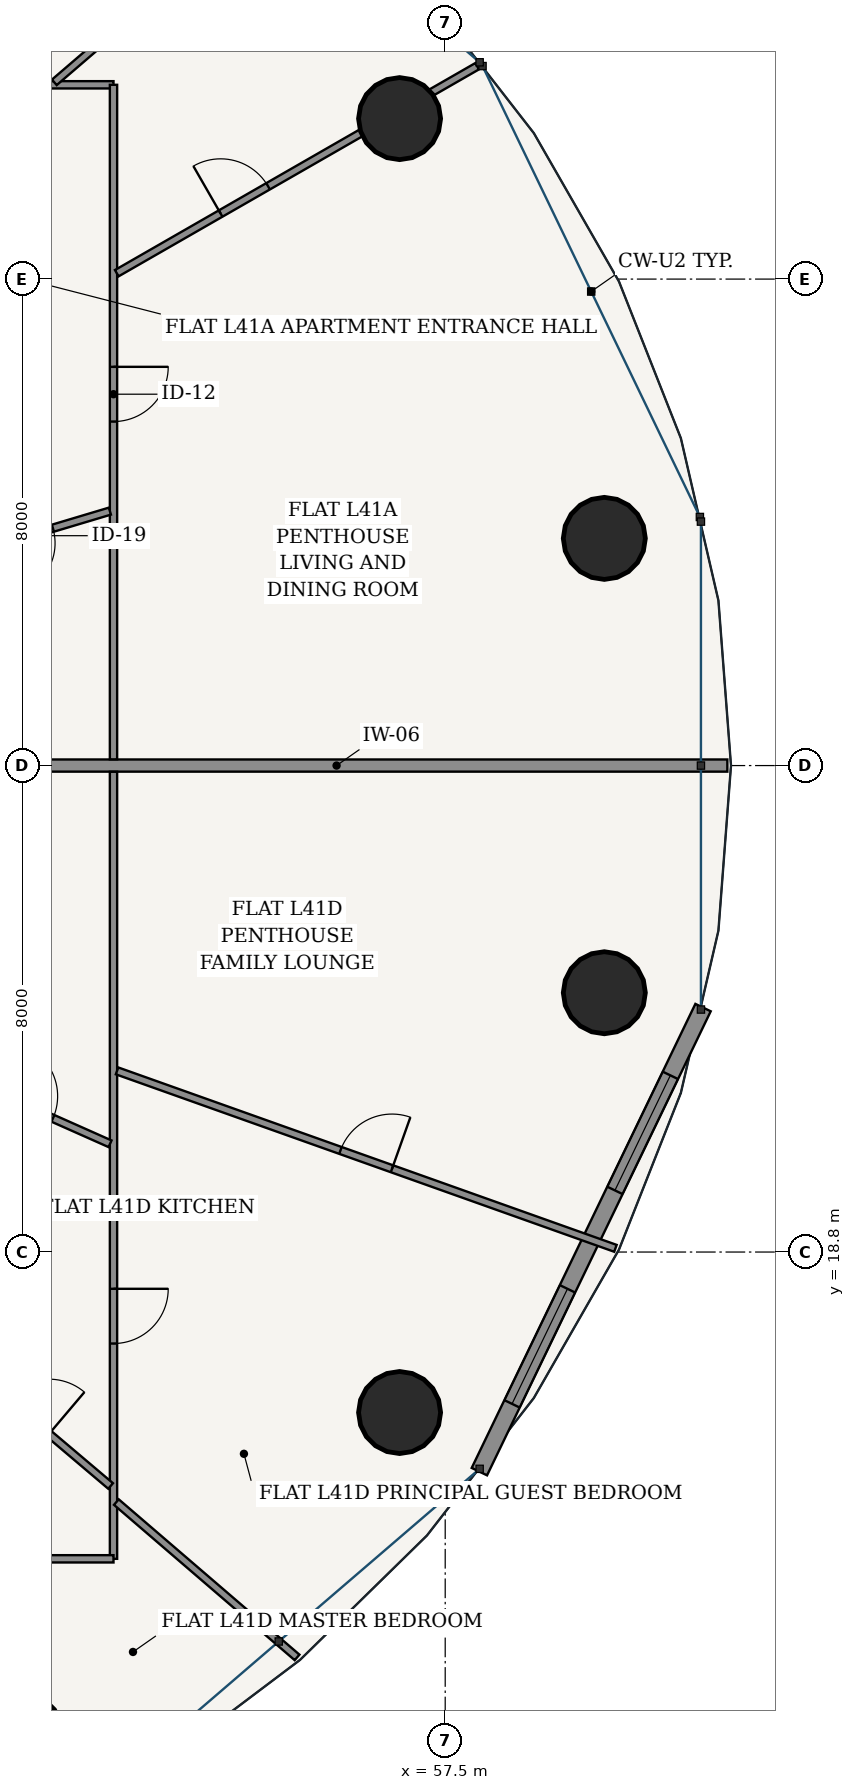
"""IFC4 building model, lengths in metres.
Left out: names, types, materials, properties, quantities, classifications, styles, units other than length and angle.
Written with IfcOpenShell. Run it as: python <this file> out.ifc"""

import sys

from ifc_helpers import new_model, si_unit, direction, frame, frame_2d, origin, origin_2d, place, context, subcontext, project, spatial, rectangle, hollow_circle, extrude, source, transform, mapped, element, fill, save


model = new_model("IFC4")
c1 = context("Model", 3, precision=1e-05, world=origin(), true_north=direction((-0.2419218956, 0.970295726276)))
c2 = subcontext(c1, "Body", "Model", "MODEL_VIEW")
j1 = project(units=[si_unit("LENGTHUNIT", "METRE"), si_unit("PLANEANGLEUNIT", "RADIAN")], contexts=[c1])
p1 = place(None, origin())
s1 = spatial("IfcSite", under=j1, at=p1, CompositionType="ELEMENT")
p2 = place(p1, origin())
s2 = spatial("IfcBuilding", under=s1, at=p2, CompositionType="ELEMENT")
p3 = place(p2, frame((0.0, 0.0, 157.0)))
s3 = spatial("IfcBuildingStorey", under=s2, at=p3, CompositionType="ELEMENT", Elevation=157.0)
for number, where, z_axis, x_axis in (
    (1, (60.117, 30.536, 0.0), (0.0, 0.0, 1.0), (1.0, 0.0, 0.0)),
    (2, (56.75, 37.439, 0.0), (0.0, 0.0, 1.0), (1.0, 0.0, 0.0)),
    (3, (50.528, 10.877, 0.0), (0.0, 0.0, 1.0), (1.0, 0.0, 0.0)),
    (4, (56.75, 16.161, 0.0), (0.0, 0.0, 1.0), (1.0, 0.0, 0.0)),
    (5, (60.117, 23.064, 0.0), (0.0, 0.0, 1.0), (1.0, 0.0, 0.0)),
):
    element("IfcColumn", number, at=place(p3, frame(where, z_axis=z_axis, x_axis=x_axis)), inside=s3, PredefinedType="COLUMN", context=c2, shape_type="SweptSolid", body=[
        extrude(hollow_circle(Radius=0.675, WallThickness=0.042, at=origin_2d()), origin(), (0.0, 0.0, 1.0), 3.6),
    ])
p4 = place(p3, frame((58.062, 15.189, 0.0), z_axis=(0.0, 0.0, 1.0), x_axis=(0.434209827226, 0.900811759437, 0.0)))
e6 = element("IfcWall", 6, at=p4, inside=s3, PredefinedType="SOLIDWALL", context=c2, shape_type="SweptSolid", body=[
    extrude(rectangle(XDim=8.472, YDim=0.28, at=frame_2d((4.236, 0.0))), origin(), (0.0, 0.0, 1.0), 3.33),
])
p5 = place(p4, frame((1.237, 0.0, 0.85)))
e7 = element("IfcOpeningElement", 7, at=p5, cuts=e6, PredefinedType="OPENING", context=c2, shape_type="SweptSolid", body=[
    extrude(rectangle(XDim=2.1, YDim=1.95, at=frame_2d((1.05, 0.975))), frame((0.0, 0.15, 0.0), z_axis=(0.0, -1.0, 0.0), x_axis=(1.0, 0.0, 0.0)), (0.0, 0.0, 1.0), 0.3),
])
p6 = place(p4, frame((5.134, 0.0, 0.85)))
e8 = element("IfcOpeningElement", 8, at=p6, cuts=e6, PredefinedType="OPENING", context=c2, shape_type="SweptSolid", body=[
    extrude(rectangle(XDim=2.1, YDim=1.95, at=frame_2d((1.05, 0.975))), frame((0.0, 0.15, 0.0), z_axis=(0.0, -1.0, 0.0), x_axis=(1.0, 0.0, 0.0)), (0.0, 0.0, 1.0), 0.3),
])
p7 = place(p3, frame((49.287, 26.8, 0.0), z_axis=(0.0, 0.0, 1.0), x_axis=(1.0, 0.0, 0.0)))
e9 = element("IfcWall", 9, at=p7, inside=s3, PredefinedType="PARTITIONING", context=c2, shape_type="SweptSolid", body=[
    extrude(rectangle(XDim=12.853, YDim=0.2, at=frame_2d((6.426, 0.0))), origin(), (0.0, 0.0, 1.0), 2.846),
])
p8 = place(p3, frame((44.355, 37.995, 0.0), z_axis=(0.0, 0.0, 1.0), x_axis=(1.0, 0.0, 0.0)))
e10 = element("IfcWall", 10, at=p8, inside=s3, PredefinedType="PARTITIONING", context=c2, shape_type="SweptSolid", body=[
    extrude(rectangle(XDim=7.69, YDim=0.12, at=frame_2d((3.845, 0.0))), origin(), (0.0, 0.0, 1.0), 2.776),
])
p9 = place(p8, frame((0.887, 0.0, 0.0)))
e11 = element("IfcOpeningElement", 11, at=p9, cuts=e10, PredefinedType="OPENING", context=c2, shape_type="SweptSolid", body=[
    extrude(rectangle(XDim=0.9, YDim=2.15, at=frame_2d((0.45, 1.075))), frame((0.0, 0.07, 0.0), z_axis=(0.0, -1.0, 0.0), x_axis=(1.0, 0.0, 0.0)), (0.0, 0.0, 1.0), 0.14),
])
p10 = place(p3, frame((52.045, 37.995, 0.0), z_axis=(0.0, 0.0, 1.0), x_axis=(0.0, -1.0, 0.0)))
e12 = element("IfcWall", 12, at=p10, inside=s3, PredefinedType="PARTITIONING", context=c2, shape_type="SweptSolid", body=[
    extrude(rectangle(XDim=11.093, YDim=0.12, at=frame_2d((5.546, 0.0))), origin(), (0.0, 0.0, 1.0), 2.776),
])
p11 = place(p10, frame((4.638, 0.0, 0.0)))
e13 = element("IfcOpeningElement", 13, at=p11, cuts=e12, PredefinedType="OPENING", context=c2, shape_type="SweptSolid", body=[
    extrude(rectangle(XDim=0.9, YDim=2.15, at=frame_2d((0.45, 1.075))), frame((0.0, 0.07, 0.0), z_axis=(0.0, -1.0, 0.0), x_axis=(1.0, 0.0, 0.0)), (0.0, 0.0, 1.0), 0.14),
])
p12 = place(p3, frame((52.099, 34.897, 0.0), z_axis=(0.0, 0.0, 1.0), x_axis=(0.867170536447, 0.498011305813, 0.0)))
e14 = element("IfcWall", 14, at=p12, inside=s3, PredefinedType="PARTITIONING", context=c2, shape_type="SweptSolid", body=[
    extrude(rectangle(XDim=6.834, YDim=0.12, at=frame_2d((3.417, 0.0))), origin(), (0.0, 0.0, 1.0), 2.776),
])
p13 = place(p12, frame((1.969, 0.0, 0.0)))
e15 = element("IfcOpeningElement", 15, at=p13, cuts=e14, PredefinedType="OPENING", context=c2, shape_type="SweptSolid", body=[
    extrude(rectangle(XDim=0.9, YDim=2.15, at=frame_2d((0.45, 1.075))), frame((0.0, 0.07, 0.0), z_axis=(0.0, -1.0, 0.0), x_axis=(1.0, 0.0, 0.0)), (0.0, 0.0, 1.0), 0.14),
])
p14 = place(p3, frame((51.072, 38.035, 0.0), z_axis=(0.0, 0.0, 1.0), x_axis=(0.758368609512, 0.65182593697, 0.0)))
e16 = element("IfcWall", 16, at=p14, inside=s3, PredefinedType="PARTITIONING", context=c2, shape_type="SweptSolid", body=[
    extrude(rectangle(XDim=5.263, YDim=0.12, at=frame_2d((2.632, 0.0))), origin(), (0.0, 0.0, 1.0), 2.846),
])
p15 = place(p3, frame((46.741, 38.044, 0.0), z_axis=(0.0, 0.0, 1.0), x_axis=(0.613770587295, 0.789484430607, 0.0)))
e17 = element("IfcWall", 17, at=p15, inside=s3, PredefinedType="PARTITIONING", context=c2, shape_type="SweptSolid", body=[
    extrude(rectangle(XDim=7.556, YDim=0.12, at=frame_2d((3.778, 0.0))), origin(), (0.0, 0.0, 1.0), 2.776),
])
p16 = place(p15, frame((2.325, 0.0, 0.0)))
e18 = element("IfcOpeningElement", 18, at=p16, cuts=e17, PredefinedType="OPENING", context=c2, shape_type="SweptSolid", body=[
    extrude(rectangle(XDim=0.9, YDim=2.15, at=frame_2d((0.45, 1.075))), frame((0.0, 0.07, 0.0), z_axis=(0.0, -1.0, 0.0), x_axis=(1.0, 0.0, 0.0)), (0.0, 0.0, 1.0), 0.14),
])
p17 = place(p3, frame((49.287, 30.177, 0.0), z_axis=(0.0, 0.0, 1.0), x_axis=(0.958045462778, 0.28661627876, 0.0)))
e19 = element("IfcWall", 19, at=p17, inside=s3, PredefinedType="PARTITIONING", context=c2, shape_type="SweptSolid", body=[
    extrude(rectangle(XDim=2.817, YDim=0.12, at=frame_2d((1.408, 0.0))), origin(), (0.0, 0.0, 1.0), 3.33),
])
p18 = place(p17, frame((0.979, 0.0, 0.0)))
e20 = element("IfcOpeningElement", 20, at=p18, cuts=e19, PredefinedType="OPENING", context=c2, shape_type="SweptSolid", body=[
    extrude(rectangle(XDim=0.86, YDim=2.15, at=frame_2d((0.43, 1.075))), frame((0.0, 0.07, 0.0), z_axis=(0.0, -1.0, 0.0), x_axis=(1.0, 0.0, 0.0)), (0.0, 0.0, 1.0), 0.14),
])
p19 = place(p3, frame((52.045, 26.698, 0.0), z_axis=(0.0, 0.0, 1.0), x_axis=(0.0, -1.0, 0.0)))
e21 = element("IfcWall", 21, at=p19, inside=s3, PredefinedType="PARTITIONING", context=c2, shape_type="SweptSolid", body=[
    extrude(rectangle(XDim=12.943, YDim=0.12, at=frame_2d((6.472, 0.0))), origin(), (0.0, 0.0, 1.0), 2.776),
])
p20 = place(p19, frame((8.503, 0.0, 0.0)))
e22 = element("IfcOpeningElement", 22, at=p20, cuts=e21, PredefinedType="OPENING", context=c2, shape_type="SweptSolid", body=[
    extrude(rectangle(XDim=0.9, YDim=2.15, at=frame_2d((0.45, 1.075))), frame((0.0, 0.07, 0.0), z_axis=(0.0, -1.0, 0.0), x_axis=(1.0, 0.0, 0.0)), (0.0, 0.0, 1.0), 0.14),
])
p21 = place(p3, frame((52.045, 13.755, 0.0), z_axis=(0.0, 0.0, 1.0), x_axis=(-1.0, 0.0, 0.0)))
e23 = element("IfcWall", 23, at=p21, inside=s3, PredefinedType="PARTITIONING", context=c2, shape_type="SweptSolid", body=[
    extrude(rectangle(XDim=13.943, YDim=0.12, at=frame_2d((6.971, 0.0))), origin(), (0.0, 0.0, 1.0), 2.776),
])
p22 = place(p21, frame((5.9, 0.0, 0.0)))
e24 = element("IfcOpeningElement", 24, at=p22, cuts=e23, PredefinedType="OPENING", context=c2, shape_type="SweptSolid", body=[
    extrude(rectangle(XDim=0.9, YDim=2.15, at=frame_2d((0.45, 1.075))), frame((0.0, 0.07, 0.0), z_axis=(0.0, -1.0, 0.0), x_axis=(1.0, 0.0, 0.0)), (0.0, 0.0, 1.0), 0.14),
])
p23 = place(p21, frame((1.622, 0.0, 0.0)))
e25 = element("IfcOpeningElement", 25, at=p23, cuts=e23, PredefinedType="OPENING", context=c2, shape_type="SweptSolid", body=[
    extrude(rectangle(XDim=0.9, YDim=2.15, at=frame_2d((0.45, 1.075))), frame((0.0, 0.07, 0.0), z_axis=(0.0, -1.0, 0.0), x_axis=(1.0, 0.0, 0.0)), (0.0, 0.0, 1.0), 0.14),
])
p24 = place(p3, frame((48.179, 13.706, 0.0), z_axis=(0.0, 0.0, 1.0), x_axis=(0.613759011764, -0.789493429662, 0.0)))
e26 = element("IfcWall", 26, at=p24, inside=s3, PredefinedType="PARTITIONING", context=c2, shape_type="SweptSolid", body=[
    extrude(rectangle(XDim=5.212, YDim=0.12, at=frame_2d((2.606, 0.0))), origin(), (0.0, 0.0, 1.0), 2.776),
])
p25 = place(p3, frame((52.092, 14.688, 0.0), z_axis=(0.0, 0.0, 1.0), x_axis=(0.758367509429, -0.651827216862, 0.0)))
e27 = element("IfcWall", 27, at=p25, inside=s3, PredefinedType="PARTITIONING", context=c2, shape_type="SweptSolid", body=[
    extrude(rectangle(XDim=3.918, YDim=0.12, at=frame_2d((1.959, 0.0))), origin(), (0.0, 0.0, 1.0), 2.846),
])
p26 = place(p3, frame((52.104, 21.779, 0.0), z_axis=(0.0, 0.0, 1.0), x_axis=(0.942081743482, -0.335383345736, 0.0)))
e28 = element("IfcWall", 28, at=p26, inside=s3, PredefinedType="PARTITIONING", context=c2, shape_type="SweptSolid", body=[
    extrude(rectangle(XDim=8.7, YDim=0.12, at=frame_2d((4.35, 0.0))), origin(), (0.0, 0.0, 1.0), 2.846),
])
p27 = place(p26, frame((3.9, 0.0, 0.0)))
e29 = element("IfcOpeningElement", 29, at=p27, cuts=e28, PredefinedType="OPENING", context=c2, shape_type="SweptSolid", body=[
    extrude(rectangle(XDim=0.9, YDim=2.15, at=frame_2d((0.45, 1.075))), frame((0.0, 0.07, 0.0), z_axis=(0.0, -1.0, 0.0), x_axis=(1.0, 0.0, 0.0)), (0.0, 0.0, 1.0), 0.14),
])
p28 = place(p3, frame((49.287, 17.248, 0.0), z_axis=(0.0, 0.0, 1.0), x_axis=(0.763274158734, -0.646074731443, 0.0)))
e30 = element("IfcWall", 30, at=p28, inside=s3, PredefinedType="PARTITIONING", context=c2, shape_type="SweptSolid", body=[
    extrude(rectangle(XDim=3.552, YDim=0.12, at=frame_2d((1.776, 0.0))), origin(), (0.0, 0.0, 1.0), 3.005),
])
p29 = place(p28, frame((1.326, 0.0, 0.0)))
e31 = element("IfcOpeningElement", 31, at=p29, cuts=e30, PredefinedType="OPENING", context=c2, shape_type="SweptSolid", body=[
    extrude(rectangle(XDim=0.9, YDim=2.15, at=frame_2d((0.45, 1.075))), frame((0.0, 0.07, 0.0), z_axis=(0.0, -1.0, 0.0), x_axis=(1.0, 0.0, 0.0)), (0.0, 0.0, 1.0), 0.14),
])
p30 = place(p3, frame((49.287, 21.781, 0.0), z_axis=(0.0, 0.0, 1.0), x_axis=(0.913743428873, -0.406291700864, 0.0)))
e32 = element("IfcWall", 32, at=p30, inside=s3, PredefinedType="PARTITIONING", context=c2, shape_type="SweptSolid", body=[
    extrude(rectangle(XDim=2.957, YDim=0.12, at=frame_2d((1.478, 0.0))), origin(), (0.0, 0.0, 1.0), 3.33),
])
p31 = place(p30, frame((1.028, 0.0, 0.0)))
e33 = element("IfcOpeningElement", 33, at=p31, cuts=e32, PredefinedType="OPENING", context=c2, shape_type="SweptSolid", body=[
    extrude(rectangle(XDim=0.9, YDim=2.15, at=frame_2d((0.45, 1.075))), frame((0.0, 0.07, 0.0), z_axis=(0.0, -1.0, 0.0), x_axis=(1.0, 0.0, 0.0)), (0.0, 0.0, 1.0), 0.14),
])
m1 = source(origin(), c2, "Body", "SweptSolid", [
    extrude(rectangle(XDim=2.1, YDim=1.95, at=frame_2d((1.05, 0.975))), frame((0.0, 0.03, 0.0), z_axis=(0.0, -1.0, 0.0), x_axis=(1.0, 0.0, 0.0)), (0.0, 0.0, 1.0), 0.06),
])
p32 = place(p5, origin())
e34 = element("IfcWindow", 34, at=p32, inside=s3, PartitioningType="SINGLE_PANEL", PredefinedType="WINDOW", context=c2, shape_type="MappedRepresentation", body=[
    mapped(m1, transform((0.0, 0.0, 0.0), scale=1.0)),
])
fill(e7, e34)
p33 = place(p6, origin())
e35 = element("IfcWindow", 35, at=p33, inside=s3, PartitioningType="SINGLE_PANEL", PredefinedType="WINDOW", context=c2, shape_type="MappedRepresentation", body=[
    mapped(m1, transform((0.0, 0.0, 0.0), scale=1.0)),
])
fill(e8, e35)
m2 = source(origin(), c2, "Body", "SweptSolid", [
    extrude(rectangle(XDim=0.86, YDim=2.15, at=frame_2d((0.43, 1.075))), frame((0.0, 0.025, 0.0), z_axis=(0.0, -1.0, 0.0), x_axis=(1.0, 0.0, 0.0)), (0.0, 0.0, 1.0), 0.05),
])
p34 = place(p18, frame((0.86, 0.0, 0.0), z_axis=(0.0, 0.0, 1.0), x_axis=(-1.0, 0.0, 0.0)))
e36 = element("IfcDoor", 36, at=p34, inside=s3, OperationType="SINGLE_SWING_RIGHT", PredefinedType="DOOR", context=c2, shape_type="MappedRepresentation", body=[
    mapped(m2, transform((0.0, 0.0, 0.0), scale=1.0)),
])
fill(e20, e36)
m3 = source(origin(), c2, "Body", "SweptSolid", [
    extrude(rectangle(XDim=0.9, YDim=2.15, at=frame_2d((0.45, 1.075))), frame((0.0, 0.025, 0.0), z_axis=(0.0, -1.0, 0.0), x_axis=(1.0, 0.0, 0.0)), (0.0, 0.0, 1.0), 0.05),
])
p35 = place(p11, origin())
e37 = element("IfcDoor", 37, at=p35, inside=s3, OperationType="SINGLE_SWING_LEFT", PredefinedType="DOOR", context=c2, shape_type="MappedRepresentation", body=[
    mapped(m3, transform((0.0, 0.0, 0.0), scale=1.0)),
])
fill(e13, e37)
p36 = place(p13, origin())
e38 = element("IfcDoor", 38, at=p36, inside=s3, OperationType="SINGLE_SWING_LEFT", PredefinedType="DOOR", context=c2, shape_type="MappedRepresentation", body=[
    mapped(m3, transform((0.0, 0.0, 0.0), scale=1.0)),
])
fill(e15, e38)
p37 = place(p31, origin())
e39 = element("IfcDoor", 39, at=p37, inside=s3, OperationType="SINGLE_SWING_LEFT", PredefinedType="DOOR", context=c2, shape_type="MappedRepresentation", body=[
    mapped(m3, transform((0.0, 0.0, 0.0), scale=1.0)),
])
fill(e33, e39)
p38 = place(p20, origin())
e40 = element("IfcDoor", 40, at=p38, inside=s3, OperationType="SINGLE_SWING_LEFT", PredefinedType="DOOR", context=c2, shape_type="MappedRepresentation", body=[
    mapped(m3, transform((0.0, 0.0, 0.0), scale=1.0)),
])
fill(e22, e40)
p39 = place(p27, origin())
e41 = element("IfcDoor", 41, at=p39, inside=s3, OperationType="SINGLE_SWING_RIGHT", PredefinedType="DOOR", context=c2, shape_type="MappedRepresentation", body=[
    mapped(m3, transform((0.0, 0.0, 0.0), scale=1.0)),
])
fill(e29, e41)
save(model, sys.argv[1])
